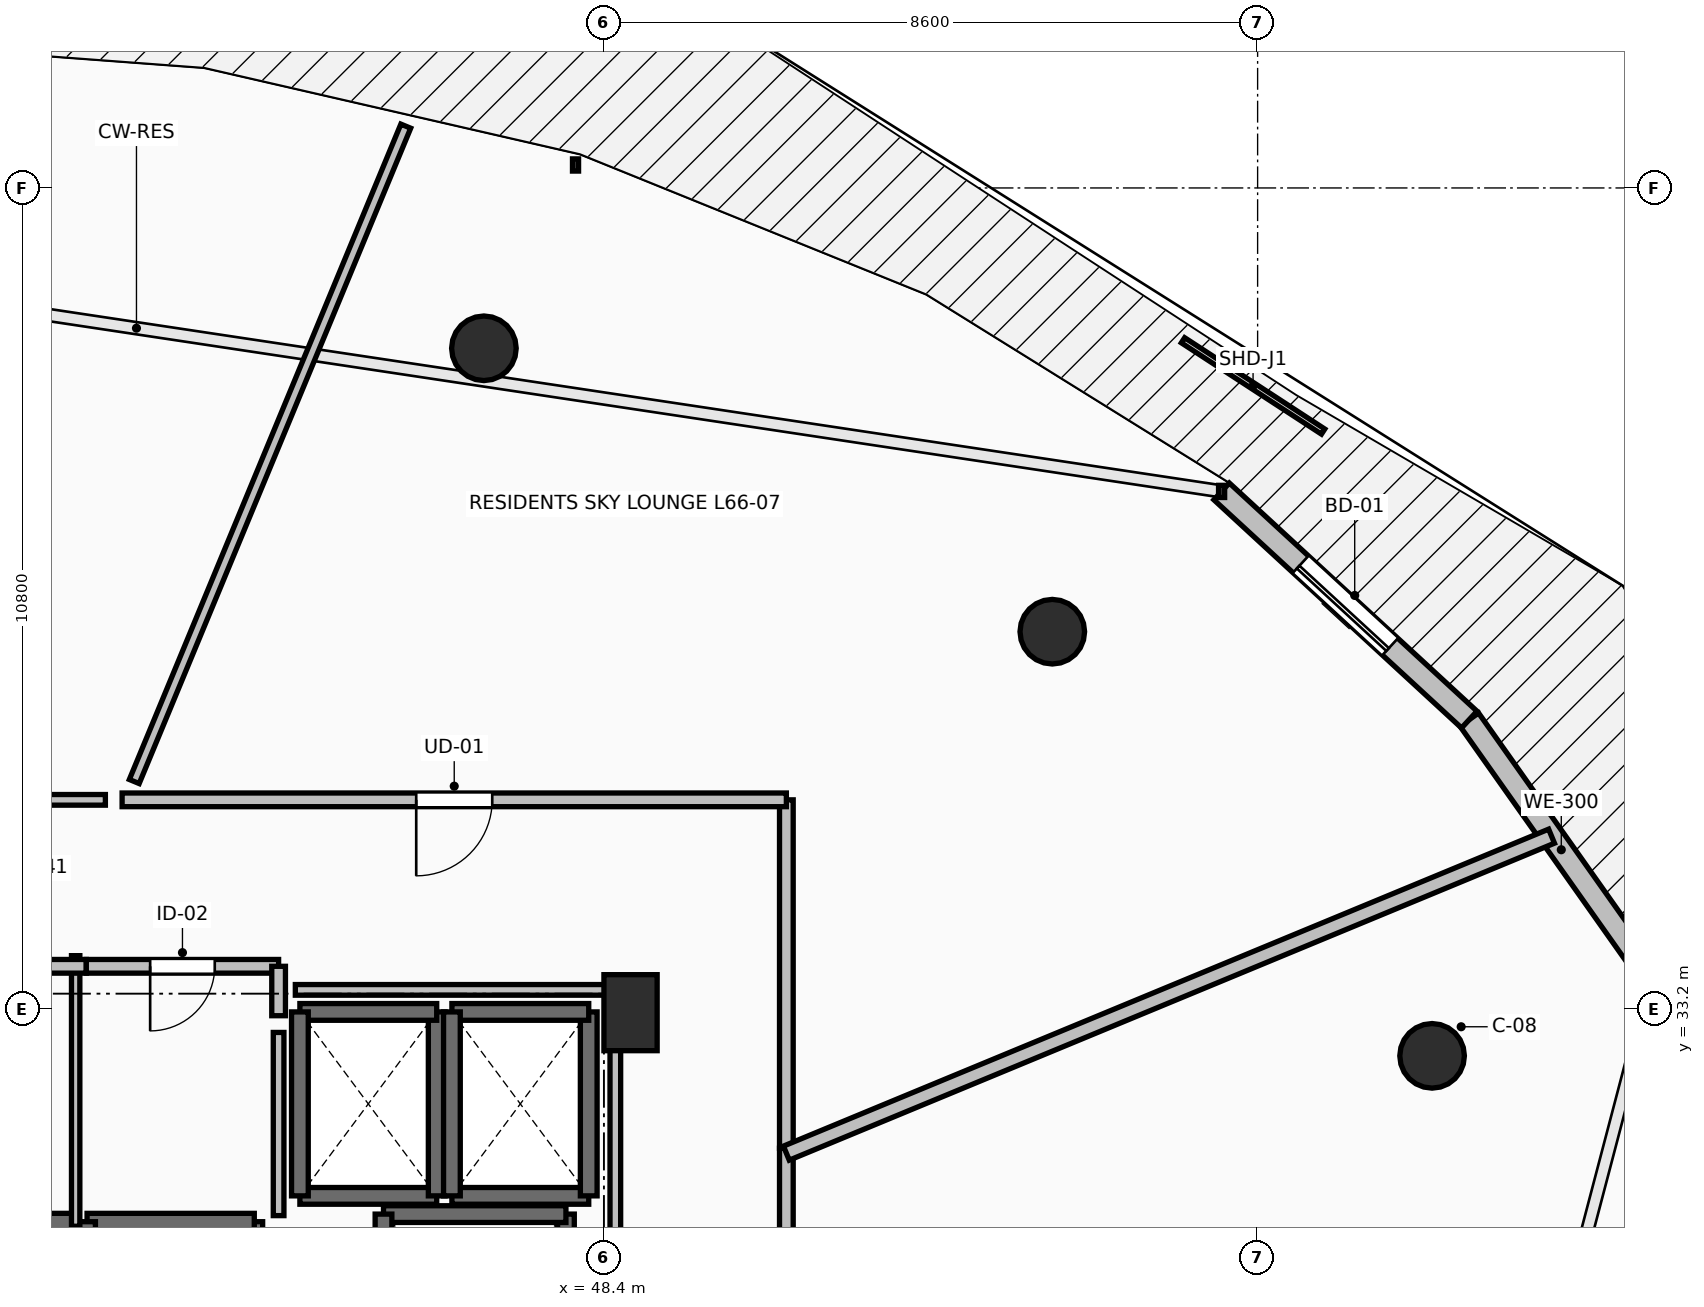
"""IFC4 building model, lengths in metres.
Left out: names, types, materials, properties, quantities, classifications, styles, units other than length and angle.
Written with IfcOpenShell. Run it as: python <this file> out.ifc"""

import sys

from ifc_helpers import new_model, si_unit, direction, frame, frame_2d, origin, origin_2d, place, context, subcontext, project, spatial, rectangle, circle, extrude, element, fill, save


model = new_model("IFC4")
c1 = context("Model", 3, precision=1e-05, world=origin(), true_north=direction((0.0, 1.0)))
c2 = subcontext(c1, "Body", "Model", "MODEL_VIEW")
j1 = project(units=[si_unit("LENGTHUNIT", "METRE"), si_unit("PLANEANGLEUNIT", "RADIAN")], contexts=[c1])
p1 = place(None, origin())
s1 = spatial("IfcSite", under=j1, at=p1, CompositionType="ELEMENT")
p2 = place(p1, origin())
s2 = spatial("IfcBuilding", under=s1, at=p2, CompositionType="ELEMENT")
p3 = place(p2, frame((0.0, 0.0, 244.9)))
s3 = spatial("IfcBuildingStorey", under=s2, at=p3, CompositionType="ELEMENT", Elevation=244.9)
for number, where, z_axis, x_axis in (
    (1, (59.295, 32.582, 0.0), (0.0, 0.0, 1.0), (0.924, 0.383, 0.0)),
    (2, (54.299, 38.162, 0.0), (0.0, 0.0, 1.0), (0.707, 0.707, 0.0)),
    (3, (46.821, 41.891, 0.0), (0.0, 0.0, 1.0), (0.383, 0.924, 0.0)),
):
    element("IfcColumn", number, at=place(p3, frame(where, z_axis=z_axis, x_axis=x_axis)), inside=s3, PredefinedType="COLUMN", context=c2, shape_type="SweptSolid", body=[
        extrude(circle(Radius=0.425, at=origin_2d()), origin(), (0.0, 0.0, 1.0), 3.55),
    ])
p4 = place(p3, frame((48.75, 33.15, 0.0), z_axis=(0.0, 0.0, 1.0), x_axis=(1.0, 0.0, 0.0)))
e4 = element("IfcColumn", 4, at=p4, inside=s3, PredefinedType="PILASTER", context=c2, shape_type="SweptSolid", body=[
    extrude(rectangle(XDim=0.7, YDim=1.0, at=origin_2d()), origin(), (0.0, 0.0, 1.0), 3.55),
])
p5 = place(p3, frame((62.206, 33.581, 0.0), z_axis=(0.0, 0.0, 1.0), x_axis=(-0.577261247247, 0.816559521668, 0.0)))
e5 = element("IfcWall", 5, at=p5, inside=s3, PredefinedType="STANDARD", context=c2, shape_type="SweptSolid", body=[
    extrude(rectangle(XDim=4.194, YDim=0.3, at=frame_2d((2.097, 0.0))), origin(), (0.0, 0.0, 1.0), 3.29),
])
p6 = place(p3, frame((59.784, 37.006, 0.0), z_axis=(0.0, 0.0, 1.0), x_axis=(-0.735445373611, 0.677584018727, 0.0)))
e6 = element("IfcWall", 6, at=p6, inside=s3, PredefinedType="STANDARD", context=c2, shape_type="SweptSolid", body=[
    extrude(rectangle(XDim=4.43, YDim=0.3, at=frame_2d((2.215, 0.0))), origin(), (0.0, 0.0, 1.0), 3.29),
])
p7 = place(p6, frame((1.415, 0.0, 0.0)))
e7 = element("IfcOpeningElement", 7, at=p7, cuts=e6, PredefinedType="OPENING", context=c2, shape_type="SweptSolid", body=[
    extrude(rectangle(XDim=1.6, YDim=2.3, at=frame_2d((0.8, 1.15))), frame((0.0, 0.165, 0.0), z_axis=(0.0, -1.0, 0.0), x_axis=(1.0, 0.0, 0.0)), (0.0, 0.0, 1.0), 0.33),
])
p8 = place(p3, frame((41.4, 27.8, 0.0), z_axis=(0.0, 0.0, 1.0), x_axis=(0.0, 1.0, 0.0)))
e8 = element("IfcWall", 8, at=p8, inside=s3, PredefinedType="SOLIDWALL", context=c2, shape_type="SweptSolid", body=[
    extrude(rectangle(XDim=2.6, YDim=0.22, at=frame_2d((1.3, 0.0))), origin(), (0.0, 0.0, 1.0), 3.29),
])
p9 = place(p3, frame((41.4, 30.4, 0.0), z_axis=(0.0, 0.0, 1.0), x_axis=(-1.0, 0.0, 0.0)))
e9 = element("IfcWall", 9, at=p9, inside=s3, PredefinedType="SOLIDWALL", context=c2, shape_type="SweptSolid", body=[
    extrude(rectangle(XDim=2.2, YDim=0.22, at=frame_2d((1.1, 0.0))), origin(), (0.0, 0.0, 1.0), 3.29),
])
p10 = place(p3, frame((43.8, 27.8, 0.0), z_axis=(0.0, 0.0, 1.0), x_axis=(0.0, 1.0, 0.0)))
e10 = element("IfcWall", 10, at=p10, inside=s3, PredefinedType="SOLIDWALL", context=c2, shape_type="SweptSolid", body=[
    extrude(rectangle(XDim=2.6, YDim=0.22, at=frame_2d((1.3, 0.0))), origin(), (0.0, 0.0, 1.0), 3.29),
])
p11 = place(p3, frame((43.8, 30.4, 0.0), z_axis=(0.0, 0.0, 1.0), x_axis=(-1.0, 0.0, 0.0)))
e11 = element("IfcWall", 11, at=p11, inside=s3, PredefinedType="SOLIDWALL", context=c2, shape_type="SweptSolid", body=[
    extrude(rectangle(XDim=2.2, YDim=0.22, at=frame_2d((1.1, 0.0))), origin(), (0.0, 0.0, 1.0), 3.29),
])
p12 = place(p3, frame((41.6, 30.4, 0.0), z_axis=(0.0, 0.0, 1.0), x_axis=(0.0, -1.0, 0.0)))
e12 = element("IfcWall", 12, at=p12, inside=s3, PredefinedType="SOLIDWALL", context=c2, shape_type="SweptSolid", body=[
    extrude(rectangle(XDim=2.6, YDim=0.22, at=frame_2d((1.3, 0.0))), origin(), (0.0, 0.0, 1.0), 3.29),
])
p13 = place(p3, frame((44.4, 30.74, 0.0), z_axis=(0.0, 0.0, 1.0), x_axis=(1.0, 0.0, 0.0)))
e13 = element("IfcWall", 13, at=p13, inside=s3, PredefinedType="SOLIDWALL", context=c2, shape_type="SweptSolid", body=[
    extrude(rectangle(XDim=1.8, YDim=0.22, at=frame_2d((0.9, 0.0))), origin(), (0.0, 0.0, 1.0), 3.29),
])
p14 = place(p3, frame((46.2, 30.74, 0.0), z_axis=(0.0, 0.0, 1.0), x_axis=(0.0, 1.0, 0.0)))
e14 = element("IfcWall", 14, at=p14, inside=s3, PredefinedType="SOLIDWALL", context=c2, shape_type="SweptSolid", body=[
    extrude(rectangle(XDim=2.42, YDim=0.22, at=frame_2d((1.21, 0.0))), origin(), (0.0, 0.0, 1.0), 3.29),
])
p15 = place(p3, frame((46.2, 33.16, 0.0), z_axis=(0.0, 0.0, 1.0), x_axis=(-1.0, 0.0, 0.0)))
e15 = element("IfcWall", 15, at=p15, inside=s3, PredefinedType="SOLIDWALL", context=c2, shape_type="SweptSolid", body=[
    extrude(rectangle(XDim=1.8, YDim=0.22, at=frame_2d((0.9, 0.0))), origin(), (0.0, 0.0, 1.0), 3.29),
])
p16 = place(p3, frame((44.4, 33.16, 0.0), z_axis=(0.0, 0.0, 1.0), x_axis=(0.0, -1.0, 0.0)))
e16 = element("IfcWall", 16, at=p16, inside=s3, PredefinedType="SOLIDWALL", context=c2, shape_type="SweptSolid", body=[
    extrude(rectangle(XDim=2.42, YDim=0.22, at=frame_2d((1.21, 0.0))), origin(), (0.0, 0.0, 1.0), 3.29),
])
p17 = place(p3, frame((46.4, 30.74, 0.0), z_axis=(0.0, 0.0, 1.0), x_axis=(1.0, 0.0, 0.0)))
e17 = element("IfcWall", 17, at=p17, inside=s3, PredefinedType="SOLIDWALL", context=c2, shape_type="SweptSolid", body=[
    extrude(rectangle(XDim=1.8, YDim=0.22, at=frame_2d((0.9, 0.0))), origin(), (0.0, 0.0, 1.0), 3.29),
])
p18 = place(p3, frame((48.2, 30.74, 0.0), z_axis=(0.0, 0.0, 1.0), x_axis=(0.0, 1.0, 0.0)))
e18 = element("IfcWall", 18, at=p18, inside=s3, PredefinedType="SOLIDWALL", context=c2, shape_type="SweptSolid", body=[
    extrude(rectangle(XDim=2.42, YDim=0.22, at=frame_2d((1.21, 0.0))), origin(), (0.0, 0.0, 1.0), 3.29),
])
p19 = place(p3, frame((48.2, 33.16, 0.0), z_axis=(0.0, 0.0, 1.0), x_axis=(-1.0, 0.0, 0.0)))
e19 = element("IfcWall", 19, at=p19, inside=s3, PredefinedType="SOLIDWALL", context=c2, shape_type="SweptSolid", body=[
    extrude(rectangle(XDim=1.8, YDim=0.22, at=frame_2d((0.9, 0.0))), origin(), (0.0, 0.0, 1.0), 3.29),
])
p20 = place(p3, frame((46.4, 33.16, 0.0), z_axis=(0.0, 0.0, 1.0), x_axis=(0.0, -1.0, 0.0)))
e20 = element("IfcWall", 20, at=p20, inside=s3, PredefinedType="SOLIDWALL", context=c2, shape_type="SweptSolid", body=[
    extrude(rectangle(XDim=2.42, YDim=0.22, at=frame_2d((1.21, 0.0))), origin(), (0.0, 0.0, 1.0), 3.29),
])
p21 = place(p3, frame((47.9, 28.0, 0.0), z_axis=(0.0, 0.0, 1.0), x_axis=(0.0, 1.0, 0.0)))
e21 = element("IfcWall", 21, at=p21, inside=s3, PredefinedType="SHEAR", context=c2, shape_type="SweptSolid", body=[
    extrude(rectangle(XDim=2.5, YDim=0.22, at=frame_2d((1.25, 0.0))), origin(), (0.0, 0.0, 1.0), 3.29),
])
p22 = place(p3, frame((47.9, 30.5, 0.0), z_axis=(0.0, 0.0, 1.0), x_axis=(-1.0, 0.0, 0.0)))
e22 = element("IfcWall", 22, at=p22, inside=s3, PredefinedType="SHEAR", context=c2, shape_type="SweptSolid", body=[
    extrude(rectangle(XDim=2.4, YDim=0.22, at=frame_2d((1.2, 0.0))), origin(), (0.0, 0.0, 1.0), 3.29),
])
p23 = place(p3, frame((45.5, 30.5, 0.0), z_axis=(0.0, 0.0, 1.0), x_axis=(0.0, -1.0, 0.0)))
e23 = element("IfcWall", 23, at=p23, inside=s3, PredefinedType="SHEAR", context=c2, shape_type="SweptSolid", body=[
    extrude(rectangle(XDim=2.5, YDim=0.22, at=frame_2d((1.25, 0.0))), origin(), (0.0, 0.0, 1.0), 3.29),
])
p24 = place(p3, frame((41.45, 30.34, 0.0), z_axis=(0.0, 0.0, 1.0), x_axis=(0.0, 1.0, 0.0)))
e24 = element("IfcWall", 24, at=p24, inside=s3, PredefinedType="PARTITIONING", context=c2, shape_type="SweptSolid", body=[
    extrude(rectangle(XDim=3.56, YDim=0.11, at=frame_2d((1.78, 0.0))), origin(), (0.0, 0.0, 1.0), 3.29),
])
p25 = place(p3, frame((41.59, 33.76, 0.0), z_axis=(0.0, 0.0, 1.0), x_axis=(-1.0, 0.0, 0.0)))
e25 = element("IfcWall", 25, at=p25, inside=s3, PredefinedType="PARTITIONING", context=c2, shape_type="SweptSolid", body=[
    extrude(rectangle(XDim=3.44, YDim=0.18, at=frame_2d((1.72, 0.0))), origin(), (0.0, 0.0, 1.0), 3.29),
])
p26 = place(p25, frame((1.295, 0.0, 0.0)))
e26 = element("IfcOpeningElement", 26, at=p26, cuts=e25, PredefinedType="OPENING", context=c2, shape_type="SweptSolid", body=[
    extrude(rectangle(XDim=0.85, YDim=2.1, at=frame_2d((0.425, 1.05))), frame((0.0, 0.105, 0.0), z_axis=(0.0, -1.0, 0.0), x_axis=(1.0, 0.0, 0.0)), (0.0, 0.0, 1.0), 0.21),
])
p27 = place(p3, frame((44.12, 33.76, 0.0), z_axis=(0.0, 0.0, 1.0), x_axis=(-1.0, 0.0, 0.0)))
e27 = element("IfcWall", 27, at=p27, inside=s3, PredefinedType="PARTITIONING", context=c2, shape_type="SweptSolid", body=[
    extrude(rectangle(XDim=2.53, YDim=0.18, at=frame_2d((1.265, 0.0))), origin(), (0.0, 0.0, 1.0), 3.29),
])
p28 = place(p27, frame((0.84, 0.0, 0.0)))
e28 = element("IfcOpeningElement", 28, at=p28, cuts=e27, PredefinedType="OPENING", context=c2, shape_type="SweptSolid", body=[
    extrude(rectangle(XDim=0.85, YDim=2.1, at=frame_2d((0.425, 1.05))), frame((0.0, 0.105, 0.0), z_axis=(0.0, -1.0, 0.0), x_axis=(1.0, 0.0, 0.0)), (0.0, 0.0, 1.0), 0.21),
])
p29 = place(p3, frame((44.12, 33.11, 0.0), z_axis=(0.0, 0.0, 1.0), x_axis=(0.0, 1.0, 0.0)))
e29 = element("IfcWall", 29, at=p29, inside=s3, PredefinedType="PARTITIONING", context=c2, shape_type="SweptSolid", body=[
    extrude(rectangle(XDim=0.65, YDim=0.18, at=frame_2d((0.325, 0.0))), origin(), (0.0, 0.0, 1.0), 3.29),
])
p30 = place(p3, frame((50.8, 20.758, 0.0), z_axis=(0.0, 0.0, 1.0), x_axis=(0.0, 1.0, 0.0)))
e30 = element("IfcWall", 30, at=p30, inside=s3, PredefinedType="PARTITIONING", context=c2, shape_type="SweptSolid", body=[
    extrude(rectangle(XDim=10.609, YDim=0.18, at=frame_2d((5.304, 0.0))), origin(), (0.0, 0.0, 1.0), 2.482),
])
p31 = place(p30, frame((4.804, 0.0, 0.0)))
e31 = element("IfcOpeningElement", 31, at=p31, cuts=e30, PredefinedType="OPENING", context=c2, shape_type="SweptSolid", body=[
    extrude(rectangle(XDim=1.0, YDim=2.15, at=frame_2d((0.5, 1.075))), frame((0.0, 0.105, 0.0), z_axis=(0.0, -1.0, 0.0), x_axis=(1.0, 0.0, 0.0)), (0.0, 0.0, 1.0), 0.21),
])
p32 = place(p3, frame((50.8, 31.367, 0.0), z_axis=(0.0, 0.0, 1.0), x_axis=(0.0, 1.0, 0.0)))
e32 = element("IfcWall", 32, at=p32, inside=s3, PredefinedType="PARTITIONING", context=c2, shape_type="SweptSolid", body=[
    extrude(rectangle(XDim=4.583, YDim=0.18, at=frame_2d((2.292, 0.0))), origin(), (0.0, 0.0, 1.0), 2.482),
])
p33 = place(p3, frame((50.8, 35.95, 0.0), z_axis=(0.0, 0.0, 1.0), x_axis=(-1.0, 0.0, 0.0)))
e33 = element("IfcWall", 33, at=p33, inside=s3, PredefinedType="PARTITIONING", context=c2, shape_type="SweptSolid", body=[
    extrude(rectangle(XDim=8.739, YDim=0.18, at=frame_2d((4.37, 0.0))), origin(), (0.0, 0.0, 1.0), 2.482),
])
p34 = place(p33, frame((3.869, 0.0, 0.0)))
e34 = element("IfcOpeningElement", 34, at=p34, cuts=e33, PredefinedType="OPENING", context=c2, shape_type="SweptSolid", body=[
    extrude(rectangle(XDim=1.0, YDim=2.15, at=frame_2d((0.5, 1.075))), frame((0.0, 0.105, 0.0), z_axis=(0.0, -1.0, 0.0), x_axis=(1.0, 0.0, 0.0)), (0.0, 0.0, 1.0), 0.21),
])
p35 = place(p3, frame((60.867, 35.472, 0.0), z_axis=(0.0, 0.0, 1.0), x_axis=(-0.923877013663, -0.382689513347, 0.0)))
e35 = element("IfcWall", 35, at=p35, inside=s3, PredefinedType="PARTITIONING", context=c2, shape_type="SweptSolid", body=[
    extrude(rectangle(XDim=10.896, YDim=0.2, at=frame_2d((5.448, 0.0))), origin(), (0.0, 0.0, 1.0), 2.482),
])
p36 = place(p3, frame((44.12, 30.48, 0.0), z_axis=(0.0, 0.0, 1.0), x_axis=(0.0, 1.0, 0.0)))
e36 = element("IfcWall", 36, at=p36, inside=s3, PredefinedType="PARTITIONING", context=c2, shape_type="SweptSolid", body=[
    extrude(rectangle(XDim=2.41, YDim=0.14, at=frame_2d((1.205, 0.0))), origin(), (0.0, 0.0, 1.0), 3.29),
])
p37 = place(p3, frame((41.841, 35.95, 0.0), z_axis=(0.0, 0.0, 1.0), x_axis=(-1.0, 0.0, 0.0)))
e37 = element("IfcWall", 37, at=p37, inside=s3, PredefinedType="PARTITIONING", context=c2, shape_type="SweptSolid", body=[
    extrude(rectangle(XDim=2.391, YDim=0.14, at=frame_2d((1.196, 0.0))), origin(), (0.0, 0.0, 1.0), 3.022),
])
p38 = place(p3, frame((48.55, 28.196, 0.0), z_axis=(0.0, 0.0, 1.0), x_axis=(0.0, 1.0, 0.0)))
e38 = element("IfcWall", 38, at=p38, inside=s3, PredefinedType="PARTITIONING", context=c2, shape_type="SweptSolid", body=[
    extrude(rectangle(XDim=5.254, YDim=0.14, at=frame_2d((2.627, 0.0))), origin(), (0.0, 0.0, 1.0), 2.482),
])
p39 = place(p3, frame((48.55, 33.45, 0.0), z_axis=(0.0, 0.0, 1.0), x_axis=(-1.0, 0.0, 0.0)))
e39 = element("IfcWall", 39, at=p39, inside=s3, PredefinedType="PARTITIONING", context=c2, shape_type="SweptSolid", body=[
    extrude(rectangle(XDim=4.21, YDim=0.14, at=frame_2d((2.105, 0.0))), origin(), (0.0, 0.0, 1.0), 2.482),
])
p40 = place(p3, frame((45.793, 44.813, 0.0), z_axis=(0.0, 0.0, 1.0), x_axis=(-0.382742241568, -0.923855170749, 0.0)))
e40 = element("IfcWall", 40, at=p40, inside=s3, PredefinedType="PARTITIONING", context=c2, shape_type="SweptSolid", body=[
    extrude(rectangle(XDim=9.333, YDim=0.14, at=frame_2d((4.667, 0.0))), origin(), (0.0, 0.0, 1.0), 2.874),
])
p41 = place(p7, origin())
e41 = element("IfcDoor", 41, at=p41, inside=s3, OperationType="SLIDING_TO_LEFT", PredefinedType="DOOR", context=c2, shape_type="SweptSolid", body=[
    extrude(rectangle(XDim=1.6, YDim=2.3, at=frame_2d((0.8, 1.15))), frame((0.0, 0.025, 0.0), z_axis=(0.0, -1.0, 0.0), x_axis=(1.0, 0.0, 0.0)), (0.0, 0.0, 1.0), 0.05),
])
fill(e7, e41)
p42 = place(p28, origin())
e42 = element("IfcDoor", 42, at=p42, inside=s3, OperationType="SINGLE_SWING_RIGHT", PredefinedType="DOOR", context=c2, shape_type="SweptSolid", body=[
    extrude(rectangle(XDim=0.85, YDim=2.1, at=frame_2d((0.425, 1.05))), frame((0.0, 0.025, 0.0), z_axis=(0.0, -1.0, 0.0), x_axis=(1.0, 0.0, 0.0)), (0.0, 0.0, 1.0), 0.05),
])
fill(e28, e42)
p43 = place(p34, origin())
e43 = element("IfcDoor", 43, at=p43, inside=s3, OperationType="SINGLE_SWING_RIGHT", PredefinedType="DOOR", context=c2, shape_type="SweptSolid", body=[
    extrude(rectangle(XDim=1.0, YDim=2.15, at=frame_2d((0.5, 1.075))), frame((0.0, 0.025, 0.0), z_axis=(0.0, -1.0, 0.0), x_axis=(1.0, 0.0, 0.0)), (0.0, 0.0, 1.0), 0.05),
])
fill(e34, e43)
save(model, sys.argv[1])
